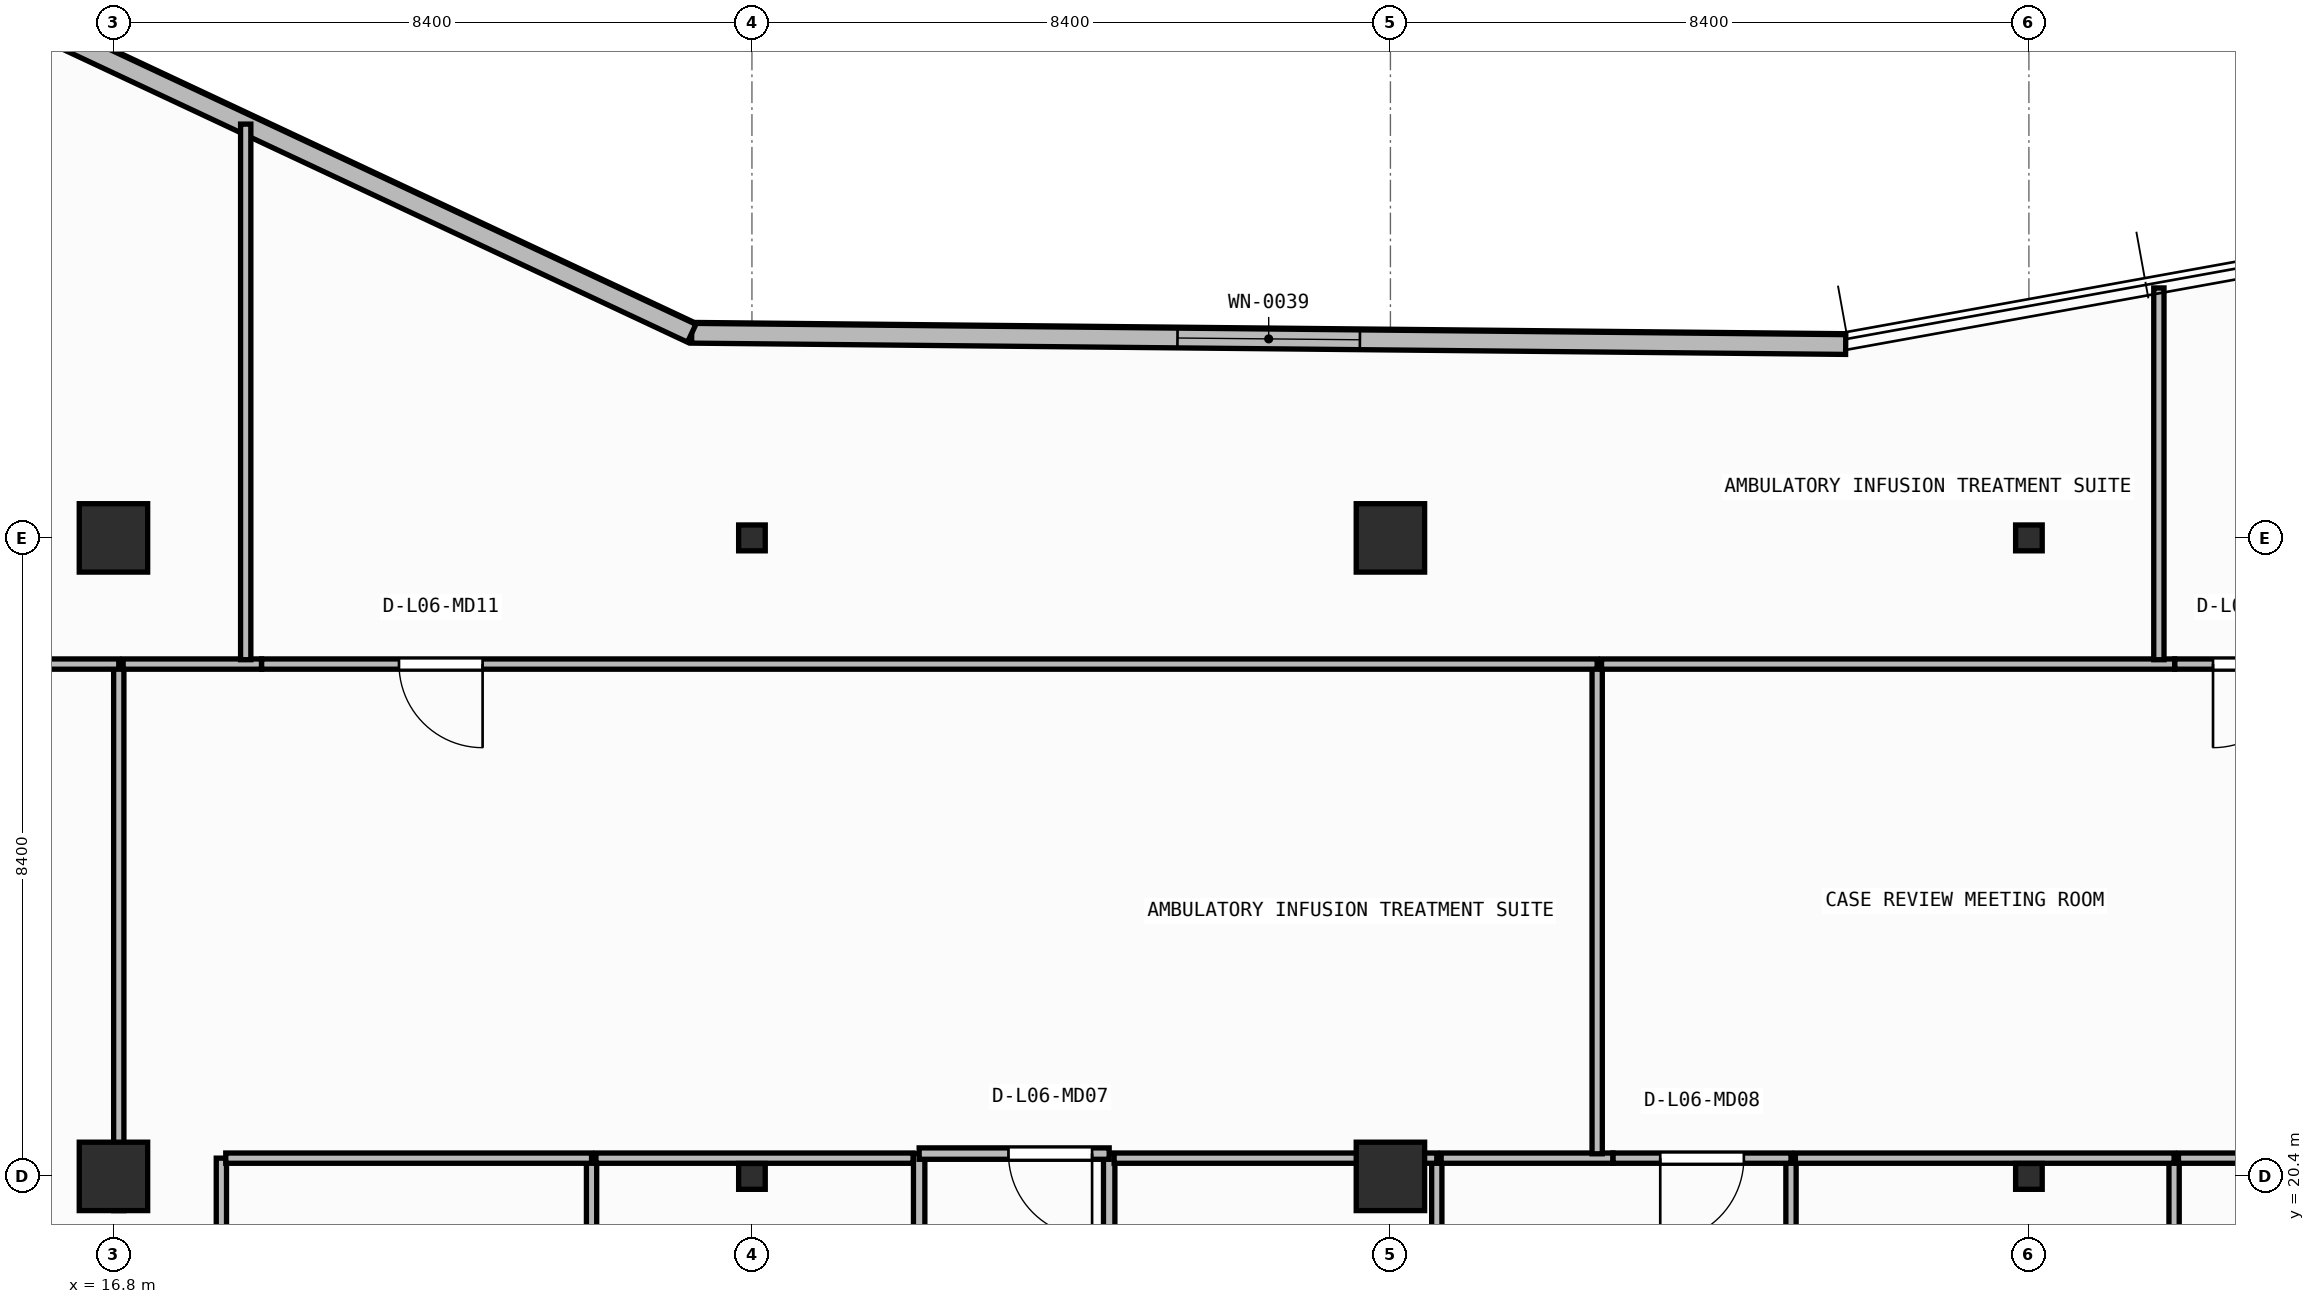
"""IFC4 building model, lengths in metres.
Left out: names, types, materials, properties, quantities, classifications, styles, units other than length and angle.
Written with IfcOpenShell. Run it as: python <this file> out.ifc"""

import sys

from ifc_helpers import new_model, si_unit, direction, frame, frame_2d, origin, origin_2d, place, context, subcontext, project, spatial, rectangle, i_section, extrude, element, fill, save


model = new_model("IFC4")
c1 = context("Model", 3, precision=1e-05, world=origin(), true_north=direction((0.0, 1.0)))
c2 = subcontext(c1, "Body", "Model", "MODEL_VIEW")
j1 = project(units=[si_unit("LENGTHUNIT", "METRE"), si_unit("PLANEANGLEUNIT", "RADIAN")], contexts=[c1])
p1 = place(None, origin())
s1 = spatial("IfcSite", under=j1, at=p1, CompositionType="ELEMENT")
p2 = place(p1, origin())
s2 = spatial("IfcBuilding", under=s1, at=p2, CompositionType="ELEMENT")
p3 = place(p2, frame((0.0, 0.0, 26.45)))
s3 = spatial("IfcBuildingStorey", under=s2, at=p3, CompositionType="ELEMENT", Elevation=26.45)
p4 = place(p3, frame((16.8, 20.4, 0.0), z_axis=(0.0, 0.0, 1.0), x_axis=(1.0, 0.0, 0.0)))
e1 = element("IfcColumn", 1, at=p4, inside=s3, PredefinedType="COLUMN", context=c2, shape_type="SweptSolid", body=[
    extrude(rectangle(XDim=0.9, YDim=0.9, at=origin_2d()), origin(), (0.0, 0.0, 1.0), 3.95),
])
p5 = place(p3, frame((25.2, 20.4, 0.0), z_axis=(0.0, 0.0, 1.0), x_axis=(1.0, 0.0, 0.0)))
e2 = element("IfcColumn", 2, at=p5, inside=s3, PredefinedType="COLUMN", context=c2, shape_type="SweptSolid", body=[
    extrude(i_section(OverallWidth=0.35, OverallDepth=0.34, WebThickness=0.016, FlangeThickness=0.028, at=origin_2d()), origin(), (0.0, 0.0, 1.0), 3.95),
])
p6 = place(p3, frame((33.6, 20.4, 0.0), z_axis=(0.0, 0.0, 1.0), x_axis=(1.0, 0.0, 0.0)))
e3 = element("IfcColumn", 3, at=p6, inside=s3, PredefinedType="COLUMN", context=c2, shape_type="SweptSolid", body=[
    extrude(rectangle(XDim=0.9, YDim=0.9, at=origin_2d()), origin(), (0.0, 0.0, 1.0), 3.95),
])
p7 = place(p3, frame((42.0, 20.4, 0.0), z_axis=(0.0, 0.0, 1.0), x_axis=(1.0, 0.0, 0.0)))
e4 = element("IfcColumn", 4, at=p7, inside=s3, PredefinedType="COLUMN", context=c2, shape_type="SweptSolid", body=[
    extrude(i_section(OverallWidth=0.35, OverallDepth=0.34, WebThickness=0.016, FlangeThickness=0.028, at=origin_2d()), origin(), (0.0, 0.0, 1.0), 3.95),
])
p8 = place(p3, frame((16.8, 28.8, 0.0), z_axis=(0.0, 0.0, 1.0), x_axis=(1.0, 0.0, 0.0)))
e5 = element("IfcColumn", 5, at=p8, inside=s3, PredefinedType="COLUMN", context=c2, shape_type="SweptSolid", body=[
    extrude(rectangle(XDim=0.9, YDim=0.9, at=origin_2d()), origin(), (0.0, 0.0, 1.0), 3.95),
])
p9 = place(p3, frame((25.2, 28.8, 0.0), z_axis=(0.0, 0.0, 1.0), x_axis=(1.0, 0.0, 0.0)))
e6 = element("IfcColumn", 6, at=p9, inside=s3, PredefinedType="COLUMN", context=c2, shape_type="SweptSolid", body=[
    extrude(i_section(OverallWidth=0.35, OverallDepth=0.34, WebThickness=0.016, FlangeThickness=0.028, at=origin_2d()), origin(), (0.0, 0.0, 1.0), 3.95),
])
p10 = place(p3, frame((33.6, 28.8, 0.0), z_axis=(0.0, 0.0, 1.0), x_axis=(1.0, 0.0, 0.0)))
e7 = element("IfcColumn", 7, at=p10, inside=s3, PredefinedType="COLUMN", context=c2, shape_type="SweptSolid", body=[
    extrude(rectangle(XDim=0.9, YDim=0.9, at=origin_2d()), origin(), (0.0, 0.0, 1.0), 3.95),
])
p11 = place(p3, frame((42.0, 28.8, 0.0), z_axis=(0.0, 0.0, 1.0), x_axis=(1.0, 0.0, 0.0)))
e8 = element("IfcColumn", 8, at=p11, inside=s3, PredefinedType="COLUMN", context=c2, shape_type="SweptSolid", body=[
    extrude(i_section(OverallWidth=0.35, OverallDepth=0.34, WebThickness=0.016, FlangeThickness=0.028, at=origin_2d()), origin(), (0.0, 0.0, 1.0), 3.95),
])
p12 = place(p3, frame((39.59, 31.344, 0.0), z_axis=(0.0, 0.0, 1.0), x_axis=(-0.999952362926, 0.009760731435, 0.0)))
e9 = element("IfcWall", 9, at=p12, inside=s3, PredefinedType="STANDARD", context=c2, shape_type="SweptSolid", body=[
    extrude(rectangle(XDim=15.183, YDim=0.26, at=frame_2d((7.591, 0.0))), origin(), (0.0, 0.0, 1.0), 3.71),
])
p13 = place(p12, frame((6.391, 0.0, 0.9)))
e10 = element("IfcOpeningElement", 10, at=p13, cuts=e9, PredefinedType="OPENING", context=c2, shape_type="SweptSolid", body=[
    extrude(rectangle(XDim=2.4, YDim=1.65, at=frame_2d((1.2, 0.825))), frame((0.0, 0.14, 0.0), z_axis=(0.0, -1.0, 0.0), x_axis=(1.0, 0.0, 0.0)), (0.0, 0.0, 1.0), 0.28),
])
p14 = place(p3, frame((24.408, 31.492, 0.0), z_axis=(0.0, 0.0, 1.0), x_axis=(-0.905396522918, 0.424566998585, 0.0)))
e11 = element("IfcWall", 11, at=p14, inside=s3, PredefinedType="STANDARD", context=c2, shape_type="SweptSolid", body=[
    extrude(rectangle(XDim=14.189, YDim=0.26, at=frame_2d((7.095, 0.0))), origin(), (0.0, 0.0, 1.0), 3.71),
])
p15 = place(p14, frame((9.145, 0.0, 0.9)))
e12 = element("IfcOpeningElement", 12, at=p15, cuts=e11, PredefinedType="OPENING", context=c2, shape_type="SweptSolid", body=[
    extrude(rectangle(XDim=2.4, YDim=1.65, at=frame_2d((1.2, 0.825))), frame((0.0, 0.14, 0.0), z_axis=(0.0, -1.0, 0.0), x_axis=(1.0, 0.0, 0.0)), (0.0, 0.0, 1.0), 0.28),
])
for number, where, z_axis, x_axis in (
    (13, (27.4, 20.7, 0.0), (0.0, 0.0, 1.0), (0.0, -1.0, 0.0)),
    (14, (29.9, 14.7, 0.0), (0.0, 0.0, 1.0), (0.0, 1.0, 0.0)),
):
    element("IfcWall", number, at=place(p3, frame(where, z_axis=z_axis, x_axis=x_axis)), inside=s3, PredefinedType="PARTITIONING", context=c2, shape_type="SweptSolid", body=[
        extrude(rectangle(XDim=6.0, YDim=0.15, at=frame_2d((3.0, 0.0))), origin(), (0.0, 0.0, 1.0), 3.71),
    ])
p16 = place(p3, frame((29.9, 20.7, 0.0), z_axis=(0.0, 0.0, 1.0), x_axis=(-1.0, 0.0, 0.0)))
e15 = element("IfcWall", 15, at=p16, inside=s3, PredefinedType="PARTITIONING", context=c2, shape_type="SweptSolid", body=[
    extrude(rectangle(XDim=2.5, YDim=0.15, at=frame_2d((1.25, 0.0))), origin(), (0.0, 0.0, 1.0), 3.073),
])
p17 = place(p16, frame((0.225, 0.0, 0.0)))
e16 = element("IfcOpeningElement", 16, at=p17, cuts=e15, PredefinedType="OPENING", context=c2, shape_type="SweptSolid", body=[
    extrude(rectangle(XDim=1.1, YDim=2.1, at=frame_2d((0.55, 1.05))), frame((0.0, 0.085, 0.0), z_axis=(0.0, -1.0, 0.0), x_axis=(1.0, 0.0, 0.0)), (0.0, 0.0, 1.0), 0.17),
])
p18 = place(p3, frame((18.22, 17.833, 0.0), z_axis=(0.0, 0.0, 1.0), x_axis=(0.0, 1.0, 0.0)))
e17 = element("IfcWall", 17, at=p18, inside=s3, PredefinedType="PARTITIONING", context=c2, shape_type="SweptSolid", body=[
    extrude(rectangle(XDim=2.807, YDim=0.135, at=frame_2d((1.404, 0.0))), origin(), (0.0, 0.0, 1.0), 3.71),
])
p19 = place(p3, frame((23.09, 14.76, 0.0), z_axis=(0.0, 0.0, 1.0), x_axis=(0.0, 1.0, 0.0)))
e18 = element("IfcWall", 18, at=p19, inside=s3, PredefinedType="PARTITIONING", context=c2, shape_type="SweptSolid", body=[
    extrude(rectangle(XDim=5.88, YDim=0.135, at=frame_2d((2.94, 0.0))), origin(), (0.0, 0.0, 1.0), 3.71),
])
p20 = place(p3, frame((23.09, 20.64, 0.0), z_axis=(0.0, 0.0, 1.0), x_axis=(-1.0, 0.0, 0.0)))
e19 = element("IfcWall", 19, at=p20, inside=s3, PredefinedType="PARTITIONING", context=c2, shape_type="SweptSolid", body=[
    extrude(rectangle(XDim=4.812, YDim=0.135, at=frame_2d((2.406, 0.0))), origin(), (0.0, 0.0, 1.0), 3.073),
])
p21 = place(p3, frame((27.32, 20.64, 0.0), z_axis=(0.0, 0.0, 1.0), x_axis=(-1.0, 0.0, 0.0)))
e20 = element("IfcWall", 20, at=p21, inside=s3, PredefinedType="PARTITIONING", context=c2, shape_type="SweptSolid", body=[
    extrude(rectangle(XDim=4.173, YDim=0.135, at=frame_2d((2.086, 0.0))), origin(), (0.0, 0.0, 1.0), 3.073),
])
p22 = place(p3, frame((34.21, 17.833, 0.0), z_axis=(0.0, 0.0, 1.0), x_axis=(0.0, 1.0, 0.0)))
e21 = element("IfcWall", 21, at=p22, inside=s3, PredefinedType="PARTITIONING", context=c2, shape_type="SweptSolid", body=[
    extrude(rectangle(XDim=2.807, YDim=0.135, at=frame_2d((1.404, 0.0))), origin(), (0.0, 0.0, 1.0), 3.71),
])
p23 = place(p3, frame((34.21, 20.64, 0.0), z_axis=(0.0, 0.0, 1.0), x_axis=(-1.0, 0.0, 0.0)))
e22 = element("IfcWall", 22, at=p23, inside=s3, PredefinedType="PARTITIONING", context=c2, shape_type="SweptSolid", body=[
    extrude(rectangle(XDim=4.245, YDim=0.135, at=frame_2d((2.123, 0.0))), origin(), (0.0, 0.0, 1.0), 3.073),
])
p24 = place(p3, frame((38.87, 14.76, 0.0), z_axis=(0.0, 0.0, 1.0), x_axis=(0.0, 1.0, 0.0)))
e23 = element("IfcWall", 23, at=p24, inside=s3, PredefinedType="PARTITIONING", context=c2, shape_type="SweptSolid", body=[
    extrude(rectangle(XDim=5.88, YDim=0.135, at=frame_2d((2.94, 0.0))), origin(), (0.0, 0.0, 1.0), 3.71),
])
p25 = place(p3, frame((36.528, 20.64, 0.0), z_axis=(0.0, 0.0, 1.0), x_axis=(-1.0, 0.0, 0.0)))
e24 = element("IfcWall", 24, at=p25, inside=s3, PredefinedType="PARTITIONING", context=c2, shape_type="SweptSolid", body=[
    extrude(rectangle(XDim=2.26, YDim=0.135, at=frame_2d((1.13, 0.0))), origin(), (0.0, 0.0, 1.0), 3.073),
])
p26 = place(p3, frame((38.87, 20.64, 0.0), z_axis=(0.0, 0.0, 1.0), x_axis=(-1.0, 0.0, 0.0)))
e25 = element("IfcWall", 25, at=p26, inside=s3, PredefinedType="PARTITIONING", context=c2, shape_type="SweptSolid", body=[
    extrude(rectangle(XDim=2.341, YDim=0.135, at=frame_2d((1.17, 0.0))), origin(), (0.0, 0.0, 1.0), 3.073),
])
p27 = place(p26, frame((0.62, 0.0, 0.0)))
e26 = element("IfcOpeningElement", 26, at=p27, cuts=e25, PredefinedType="OPENING", context=c2, shape_type="SweptSolid", body=[
    extrude(rectangle(XDim=1.1, YDim=2.1, at=frame_2d((0.55, 1.05))), frame((0.0, 0.077, 0.0), z_axis=(0.0, -1.0, 0.0), x_axis=(1.0, 0.0, 0.0)), (0.0, 0.0, 1.0), 0.155),
])
p28 = place(p3, frame((43.91, 17.833, 0.0), z_axis=(0.0, 0.0, 1.0), x_axis=(0.0, 1.0, 0.0)))
e27 = element("IfcWall", 27, at=p28, inside=s3, PredefinedType="PARTITIONING", context=c2, shape_type="SweptSolid", body=[
    extrude(rectangle(XDim=2.807, YDim=0.135, at=frame_2d((1.404, 0.0))), origin(), (0.0, 0.0, 1.0), 3.71),
])
p29 = place(p3, frame((43.91, 20.64, 0.0), z_axis=(0.0, 0.0, 1.0), x_axis=(-1.0, 0.0, 0.0)))
e28 = element("IfcWall", 28, at=p29, inside=s3, PredefinedType="PARTITIONING", context=c2, shape_type="SweptSolid", body=[
    extrude(rectangle(XDim=4.982, YDim=0.135, at=frame_2d((2.491, 0.0))), origin(), (0.0, 0.0, 1.0), 3.073),
])
p30 = place(p3, frame((45.938, 20.64, 0.0), z_axis=(0.0, 0.0, 1.0), x_axis=(-1.0, 0.0, 0.0)))
e29 = element("IfcWall", 29, at=p30, inside=s3, PredefinedType="PARTITIONING", context=c2, shape_type="SweptSolid", body=[
    extrude(rectangle(XDim=1.97, YDim=0.135, at=frame_2d((0.985, 0.0))), origin(), (0.0, 0.0, 1.0), 3.073),
])
p31 = place(p3, frame((16.87, 19.95, 0.0), z_axis=(0.0, 0.0, 1.0), x_axis=(0.0, 1.0, 0.0)))
e30 = element("IfcWall", 30, at=p31, inside=s3, PredefinedType="PARTITIONING", context=c2, shape_type="SweptSolid", body=[
    extrude(rectangle(XDim=7.19, YDim=0.135, at=frame_2d((3.595, 0.0))), origin(), (0.0, 0.0, 1.0), 3.073),
])
p32 = place(p3, frame((16.87, 27.14, 0.0), z_axis=(0.0, 0.0, 1.0), x_axis=(-1.0, 0.0, 0.0)))
e31 = element("IfcWall", 31, at=p32, inside=s3, PredefinedType="PARTITIONING", context=c2, shape_type="SweptSolid", body=[
    extrude(rectangle(XDim=9.233, YDim=0.135, at=frame_2d((4.616, 0.0))), origin(), (0.0, 0.0, 1.0), 3.71),
])
p33 = place(p3, frame((36.32, 20.698, 0.0), z_axis=(0.0, 0.0, 1.0), x_axis=(0.0, 1.0, 0.0)))
e32 = element("IfcWall", 32, at=p33, inside=s3, PredefinedType="PARTITIONING", context=c2, shape_type="SweptSolid", body=[
    extrude(rectangle(XDim=6.442, YDim=0.135, at=frame_2d((3.221, 0.0))), origin(), (0.0, 0.0, 1.0), 3.71),
])
p34 = place(p3, frame((18.748, 27.14, 0.0), z_axis=(0.0, 0.0, 1.0), x_axis=(-1.0, 0.0, 0.0)))
e33 = element("IfcWall", 33, at=p34, inside=s3, PredefinedType="PARTITIONING", context=c2, shape_type="SweptSolid", body=[
    extrude(rectangle(XDim=1.82, YDim=0.135, at=frame_2d((0.91, 0.0))), origin(), (0.0, 0.0, 1.0), 3.71),
])
p35 = place(p3, frame((36.32, 27.14, 0.0), z_axis=(0.0, 0.0, 1.0), x_axis=(-1.0, 0.0, 0.0)))
e34 = element("IfcWall", 34, at=p35, inside=s3, PredefinedType="PARTITIONING", context=c2, shape_type="SweptSolid", body=[
    extrude(rectangle(XDim=17.571, YDim=0.135, at=frame_2d((8.785, 0.0))), origin(), (0.0, 0.0, 1.0), 3.71),
])
p36 = place(p35, frame((14.663, 0.0, 0.0)))
e35 = element("IfcOpeningElement", 35, at=p36, cuts=e34, PredefinedType="OPENING", context=c2, shape_type="SweptSolid", body=[
    extrude(rectangle(XDim=1.1, YDim=2.1, at=frame_2d((0.55, 1.05))), frame((0.0, 0.077, 0.0), z_axis=(0.0, -1.0, 0.0), x_axis=(1.0, 0.0, 0.0)), (0.0, 0.0, 1.0), 0.155),
])
p37 = place(p3, frame((43.917, 27.14, 0.0), z_axis=(0.0, 0.0, 1.0), x_axis=(-1.0, 0.0, 0.0)))
e36 = element("IfcWall", 36, at=p37, inside=s3, PredefinedType="PARTITIONING", context=c2, shape_type="SweptSolid", body=[
    extrude(rectangle(XDim=7.54, YDim=0.135, at=frame_2d((3.77, 0.0))), origin(), (0.0, 0.0, 1.0), 3.71),
])
p38 = place(p3, frame((45.73, 27.14, 0.0), z_axis=(0.0, 0.0, 1.0), x_axis=(-1.0, 0.0, 0.0)))
e37 = element("IfcWall", 37, at=p38, inside=s3, PredefinedType="PARTITIONING", context=c2, shape_type="SweptSolid", body=[
    extrude(rectangle(XDim=1.811, YDim=0.135, at=frame_2d((0.905, 0.0))), origin(), (0.0, 0.0, 1.0), 3.71),
])
p39 = place(p38, frame((0.208, 0.0, 0.0)))
e38 = element("IfcOpeningElement", 38, at=p39, cuts=e37, PredefinedType="OPENING", context=c2, shape_type="SweptSolid", body=[
    extrude(rectangle(XDim=1.1, YDim=2.1, at=frame_2d((0.55, 1.05))), frame((0.0, 0.077, 0.0), z_axis=(0.0, -1.0, 0.0), x_axis=(1.0, 0.0, 0.0)), (0.0, 0.0, 1.0), 0.155),
])
p40 = place(p3, frame((18.54, 27.198, 0.0), z_axis=(0.0, 0.0, 1.0), x_axis=(0.0, 1.0, 0.0)))
e39 = element("IfcWall", 39, at=p40, inside=s3, PredefinedType="PARTITIONING", context=c2, shape_type="SweptSolid", body=[
    extrude(rectangle(XDim=7.046, YDim=0.135, at=frame_2d((3.523, 0.0))), origin(), (0.0, 0.0, 1.0), 3.71),
])
p41 = place(p3, frame((43.71, 27.198, 0.0), z_axis=(0.0, 0.0, 1.0), x_axis=(0.0, 1.0, 0.0)))
e40 = element("IfcWall", 40, at=p41, inside=s3, PredefinedType="PARTITIONING", context=c2, shape_type="SweptSolid", body=[
    extrude(rectangle(XDim=4.891, YDim=0.135, at=frame_2d((2.445, 0.0))), origin(), (0.0, 0.0, 1.0), 3.71),
])
p42 = place(p13, origin())
e41 = element("IfcWindow", 41, at=p42, inside=s3, PartitioningType="SINGLE_PANEL", PredefinedType="WINDOW", context=c2, shape_type="SweptSolid", body=[
    extrude(rectangle(XDim=2.4, YDim=1.65, at=frame_2d((1.2, 0.825))), frame((0.0, 0.03, 0.0), z_axis=(0.0, -1.0, 0.0), x_axis=(1.0, 0.0, 0.0)), (0.0, 0.0, 1.0), 0.06),
])
fill(e10, e41)
p43 = place(p17, origin())
e42 = element("IfcDoor", 42, at=p43, inside=s3, OperationType="SINGLE_SWING_LEFT", PredefinedType="DOOR", context=c2, shape_type="SweptSolid", body=[
    extrude(rectangle(XDim=1.1, YDim=2.1, at=frame_2d((0.55, 1.05))), frame((0.0, 0.025, 0.0), z_axis=(0.0, -1.0, 0.0), x_axis=(1.0, 0.0, 0.0)), (0.0, 0.0, 1.0), 0.05),
])
fill(e16, e42)
p44 = place(p27, origin())
e43 = element("IfcDoor", 43, at=p44, inside=s3, OperationType="SINGLE_SWING_RIGHT", PredefinedType="DOOR", context=c2, shape_type="SweptSolid", body=[
    extrude(rectangle(XDim=1.1, YDim=2.1, at=frame_2d((0.55, 1.05))), frame((0.0, 0.025, 0.0), z_axis=(0.0, -1.0, 0.0), x_axis=(1.0, 0.0, 0.0)), (0.0, 0.0, 1.0), 0.05),
])
fill(e26, e43)
p45 = place(p36, origin())
e44 = element("IfcDoor", 44, at=p45, inside=s3, OperationType="SINGLE_SWING_LEFT", PredefinedType="DOOR", context=c2, shape_type="SweptSolid", body=[
    extrude(rectangle(XDim=1.1, YDim=2.1, at=frame_2d((0.55, 1.05))), frame((0.0, 0.025, 0.0), z_axis=(0.0, -1.0, 0.0), x_axis=(1.0, 0.0, 0.0)), (0.0, 0.0, 1.0), 0.05),
])
fill(e35, e44)
p46 = place(p39, origin())
e45 = element("IfcDoor", 45, at=p46, inside=s3, OperationType="SINGLE_SWING_RIGHT", PredefinedType="DOOR", context=c2, shape_type="SweptSolid", body=[
    extrude(rectangle(XDim=1.1, YDim=2.1, at=frame_2d((0.55, 1.05))), frame((0.0, 0.025, 0.0), z_axis=(0.0, -1.0, 0.0), x_axis=(1.0, 0.0, 0.0)), (0.0, 0.0, 1.0), 0.05),
])
fill(e38, e45)
save(model, sys.argv[1])
